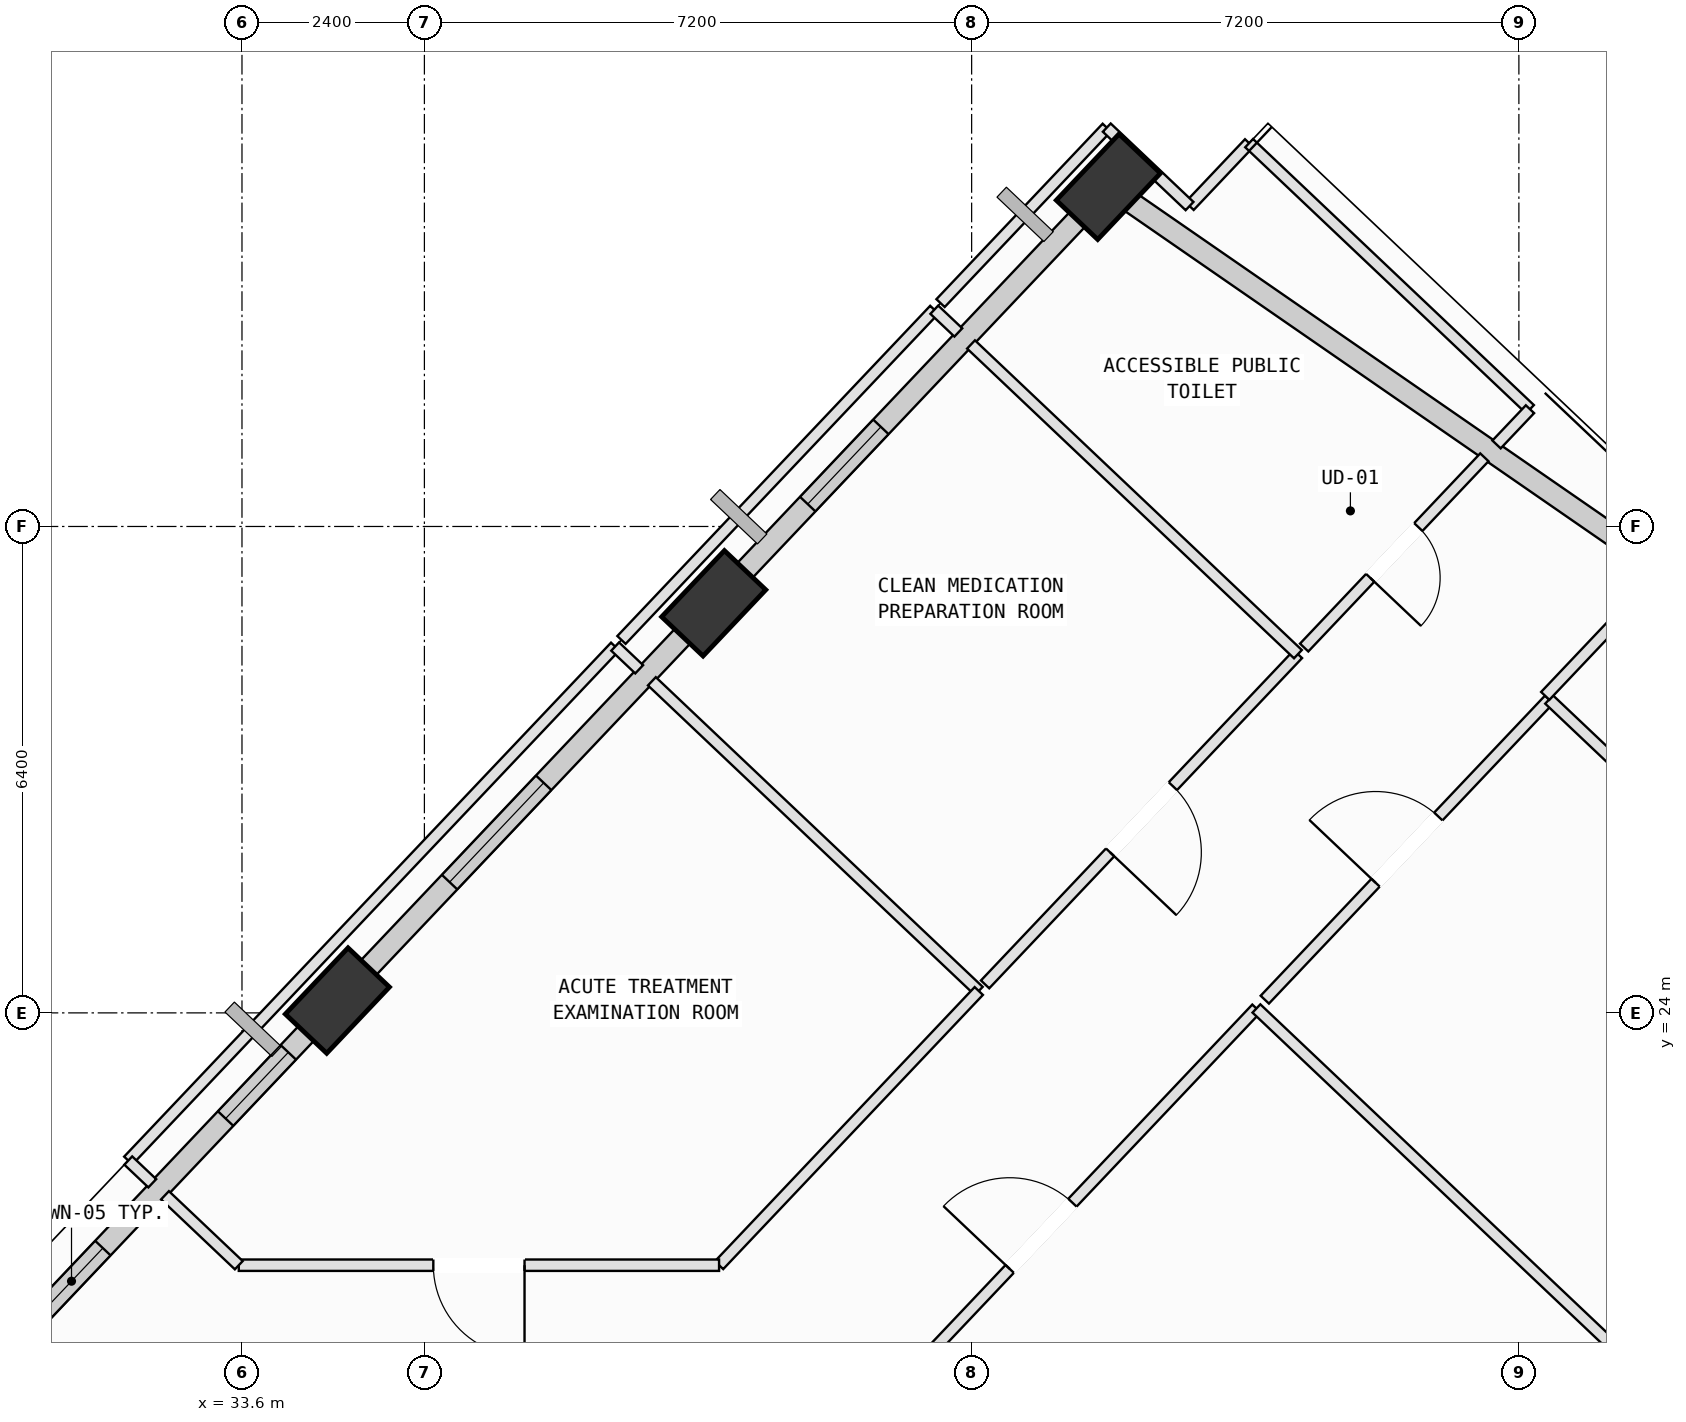
"""IFC4 building model, lengths in metres.
Left out: names, types, materials, properties, quantities, classifications, styles, units other than length and angle.
Written with IfcOpenShell. Run it as: python <this file> out.ifc"""

import sys

from ifc_helpers import new_model, si_unit, direction, frame, frame_2d, origin, origin_2d, place, context, subcontext, project, spatial, rectangle, extrude, element, fill, save


model = new_model("IFC4")
c1 = context("Model", 3, precision=1e-05, world=origin(), true_north=direction((0.0, 1.0)))
c2 = subcontext(c1, "Body", "Model", "MODEL_VIEW")
j1 = project(units=[si_unit("LENGTHUNIT", "METRE"), si_unit("PLANEANGLEUNIT", "RADIAN")], contexts=[c1])
p1 = place(None, origin())
s1 = spatial("IfcSite", under=j1, at=p1, CompositionType="ELEMENT")
p2 = place(p1, origin())
s2 = spatial("IfcBuilding", under=s1, at=p2, CompositionType="ELEMENT")
p3 = place(p2, frame((0.0, 0.0, 223.2)))
s3 = spatial("IfcBuildingStorey", under=s2, at=p3, CompositionType="ELEMENT", Elevation=223.2)
p4 = place(p3, frame((44.999, 34.87, 0.002), z_axis=(-0.042069253903, 0.046824908692, 0.998016836432), x_axis=(-0.027353525859, -0.998580716185, 0.045698335707)))
e1 = element("IfcColumn", 1, at=p4, inside=s3, PredefinedType="COLUMN", context=c2, shape_type="SweptSolid", body=[
    extrude(rectangle(XDim=1.2, YDim=0.75, at=origin_2d()), origin(), (0.0, 0.0, 1.0), 4.004),
])
p5 = place(p3, frame((39.807, 29.389, 0.002), z_axis=(-0.019233832393, 0.025584050071, 0.999487626774), x_axis=(-0.113678552433, -0.993245812131, 0.02323668222)))
e2 = element("IfcColumn", 2, at=p5, inside=s3, PredefinedType="COLUMN", context=c2, shape_type="SweptSolid", body=[
    extrude(rectangle(XDim=1.2, YDim=0.75, at=origin_2d()), origin(), (0.0, 0.0, 1.0), 3.998),
])
p6 = place(p3, frame((34.855, 24.162, 0.002), z_axis=(0.002565781789, 0.005253743664, 0.999982907325), x_axis=(-0.936541946319, -0.35052983598, 0.004244628727)))
e3 = element("IfcColumn", 3, at=p6, inside=s3, PredefinedType="COLUMN", context=c2, shape_type="SweptSolid", body=[
    extrude(rectangle(XDim=1.2, YDim=0.75, at=origin_2d()), origin(), (0.0, 0.0, 1.0), 3.996),
])
p7 = place(p3, frame((45.224, 34.714, 0.0), z_axis=(0.0, 0.0, 1.0), x_axis=(0.82254121979, -0.568705496497, 0.0)))
e4 = element("IfcWall", 4, at=p7, inside=s3, PredefinedType="SOLIDWALL", context=c2, shape_type="SweptSolid", body=[
    extrude(rectangle(XDim=9.036, YDim=0.28, at=frame_2d((4.518, 0.0))), origin(), (0.0, 0.0, 1.0), 3.265),
])
p8 = place(p3, frame((40.084, 29.682, 0.0), z_axis=(0.0, 0.0, 1.0), x_axis=(0.687708690175, 0.72598674744, 0.0)))
e5 = element("IfcWall", 5, at=p8, inside=s3, PredefinedType="SOLIDWALL", context=c2, shape_type="SweptSolid", body=[
    extrude(rectangle(XDim=6.78, YDim=0.28, at=frame_2d((3.39, 0.0))), origin(), (0.0, 0.0, 1.0), 3.165),
])
p9 = place(p8, frame((1.395, 0.0, 0.75)))
e6 = element("IfcOpeningElement", 6, at=p9, cuts=e5, PredefinedType="OPENING", context=c2, shape_type="SweptSolid", body=[
    extrude(rectangle(XDim=1.4, YDim=1.85, at=frame_2d((0.7, 0.925))), frame((0.0, 0.15, 0.0), z_axis=(0.0, -1.0, 0.0), x_axis=(1.0, 0.0, 0.0)), (0.0, 0.0, 1.0), 0.3),
])
p10 = place(p3, frame((35.136, 24.459, 0.0), z_axis=(0.0, 0.0, 1.0), x_axis=(0.687726686708, 0.725969699361, 0.0)))
e7 = element("IfcWall", 7, at=p10, inside=s3, PredefinedType="SOLIDWALL", context=c2, shape_type="SweptSolid", body=[
    extrude(rectangle(XDim=6.409, YDim=0.28, at=frame_2d((3.205, 0.0))), origin(), (0.0, 0.0, 1.0), 3.265),
])
p11 = place(p10, frame((1.738, 0.0, 0.75)))
e8 = element("IfcOpeningElement", 8, at=p11, cuts=e7, PredefinedType="OPENING", context=c2, shape_type="SweptSolid", body=[
    extrude(rectangle(XDim=1.8, YDim=2.05, at=frame_2d((0.9, 1.025))), frame((0.0, 0.15, 0.0), z_axis=(0.0, -1.0, 0.0), x_axis=(1.0, 0.0, 0.0)), (0.0, 0.0, 1.0), 0.3),
])
p12 = place(p3, frame((30.354, 19.411, 0.0), z_axis=(0.0, 0.0, 1.0), x_axis=(0.68771935581, 0.725976644007, 0.0)))
e9 = element("IfcWall", 9, at=p12, inside=s3, PredefinedType="SOLIDWALL", context=c2, shape_type="SweptSolid", body=[
    extrude(rectangle(XDim=6.158, YDim=0.28, at=frame_2d((3.079, 0.0))), origin(), (0.0, 0.0, 1.0), 3.265),
])
p13 = place(p12, frame((0.858, 0.0, 0.75)))
e10 = element("IfcOpeningElement", 10, at=p13, cuts=e9, PredefinedType="OPENING", context=c2, shape_type="SweptSolid", body=[
    extrude(rectangle(XDim=1.2, YDim=1.75, at=frame_2d((0.6, 0.875))), frame((0.0, 0.15, 0.0), z_axis=(0.0, -1.0, 0.0), x_axis=(1.0, 0.0, 0.0)), (0.0, 0.0, 1.0), 0.3),
])
p14 = place(p12, frame((4.406, 0.0, 0.75)))
e11 = element("IfcOpeningElement", 11, at=p14, cuts=e9, PredefinedType="OPENING", context=c2, shape_type="SweptSolid", body=[
    extrude(rectangle(XDim=1.2, YDim=1.75, at=frame_2d((0.6, 0.875))), frame((0.0, 0.15, 0.0), z_axis=(0.0, -1.0, 0.0), x_axis=(1.0, 0.0, 0.0)), (0.0, 0.0, 1.0), 0.3),
])
p15 = place(p3, frame((41.28, 18.076, 0.0), z_axis=(0.0, 0.0, 1.0), x_axis=(0.687723280908, 0.725972925732, 0.0)))
e12 = element("IfcWall", 12, at=p15, inside=s3, PredefinedType="PARTITIONING", context=c2, shape_type="SweptSolid", body=[
    extrude(rectangle(XDim=8.24, YDim=0.15, at=frame_2d((4.12, 0.0))), origin(), (0.0, 0.0, 1.0), 3.78),
])
p16 = place(p15, frame((3.52, 0.0, 0.0)))
e13 = element("IfcOpeningElement", 13, at=p16, cuts=e12, PredefinedType="OPENING", context=c2, shape_type="SweptSolid", body=[
    extrude(rectangle(XDim=1.2, YDim=2.15, at=frame_2d((0.6, 1.075))), frame((0.0, 0.085, 0.0), z_axis=(0.0, -1.0, 0.0), x_axis=(1.0, 0.0, 0.0)), (0.0, 0.0, 1.0), 0.17),
])
p17 = place(p3, frame((46.947, 24.058, 0.0), z_axis=(0.0, 0.0, 1.0), x_axis=(0.725954834058, -0.687742378298, 0.0)))
e14 = element("IfcWall", 14, at=p17, inside=s3, PredefinedType="PARTITIONING", context=c2, shape_type="SweptSolid", body=[
    extrude(rectangle(XDim=11.935, YDim=0.15, at=frame_2d((5.967, 0.0))), origin(), (0.0, 0.0, 1.0), 3.78),
])
p18 = place(p3, frame((47.057, 24.174, 0.0), z_axis=(0.0, 0.0, 1.0), x_axis=(0.687752117074, 0.725945607783, 0.0)))
e15 = element("IfcWall", 15, at=p18, inside=s3, PredefinedType="PARTITIONING", context=c2, shape_type="SweptSolid", body=[
    extrude(rectangle(XDim=5.44, YDim=0.15, at=frame_2d((2.72, 0.0))), origin(), (0.0, 0.0, 1.0), 3.78),
])
p19 = place(p18, frame((2.12, 0.0, 0.0)))
e16 = element("IfcOpeningElement", 16, at=p19, cuts=e15, PredefinedType="OPENING", context=c2, shape_type="SweptSolid", body=[
    extrude(rectangle(XDim=1.2, YDim=2.15, at=frame_2d((0.6, 1.075))), frame((0.0, 0.085, 0.0), z_axis=(0.0, -1.0, 0.0), x_axis=(1.0, 0.0, 0.0)), (0.0, 0.0, 1.0), 0.17),
])
p20 = place(p3, frame((50.798, 28.123, 0.0), z_axis=(0.0, 0.0, 1.0), x_axis=(0.72594065617, -0.687757343632, 0.0)))
e17 = element("IfcWall", 17, at=p20, inside=s3, PredefinedType="PARTITIONING", context=c2, shape_type="SweptSolid", body=[
    extrude(rectangle(XDim=10.134, YDim=0.15, at=frame_2d((5.067, 0.0))), origin(), (0.0, 0.0, 1.0), 3.78),
])
p21 = place(p20, frame((4.637, 0.0, 0.0)))
e18 = element("IfcOpeningElement", 18, at=p21, cuts=e17, PredefinedType="OPENING", context=c2, shape_type="SweptSolid", body=[
    extrude(rectangle(XDim=0.86, YDim=2.06, at=frame_2d((0.43, 1.03))), frame((0.0, 0.085, 0.0), z_axis=(0.0, -1.0, 0.0), x_axis=(1.0, 0.0, 0.0)), (0.0, 0.0, 1.0), 0.17),
])
p22 = place(p3, frame((32.104, 22.057, 0.0), z_axis=(0.0, 0.0, 1.0), x_axis=(0.687675585373, 0.72601810534, 0.0)))
e19 = element("IfcWall", 19, at=p22, inside=s3, PredefinedType="PARTITIONING", context=c2, shape_type="SweptSolid", body=[
    extrude(rectangle(XDim=9.315, YDim=0.15, at=frame_2d((4.658, 0.0))), origin(), (0.0, 0.0, 1.0), 3.78),
])
p23 = place(p3, frame((38.51, 28.82, 0.0), z_axis=(0.0, 0.0, 1.0), x_axis=(0.726203335954, -0.687479974145, 0.0)))
e20 = element("IfcWall", 20, at=p23, inside=s3, PredefinedType="PARTITIONING", context=c2, shape_type="SweptSolid", body=[
    extrude(rectangle(XDim=0.435, YDim=0.15, at=frame_2d((0.218, 0.0))), origin(), (0.0, 0.0, 1.0), 3.78),
])
p24 = place(p3, frame((38.993, 28.363, 0.0), z_axis=(0.0, 0.0, 1.0), x_axis=(0.725927779308, -0.687770935144, 0.0)))
e21 = element("IfcWall", 21, at=p24, inside=s3, PredefinedType="PARTITIONING", context=c2, shape_type="SweptSolid", body=[
    extrude(rectangle(XDim=5.925, YDim=0.15, at=frame_2d((2.962, 0.0))), origin(), (0.0, 0.0, 1.0), 3.78),
])
p25 = place(p3, frame((43.294, 24.288, 0.0), z_axis=(0.0, 0.0, 1.0), x_axis=(-0.687611091147, -0.726079188058, 0.0)))
e22 = element("IfcWall", 22, at=p25, inside=s3, PredefinedType="PARTITIONING", context=c2, shape_type="SweptSolid", body=[
    extrude(rectangle(XDim=4.969, YDim=0.15, at=frame_2d((2.485, 0.0))), origin(), (0.0, 0.0, 1.0), 3.78),
])
p26 = place(p3, frame((39.877, 20.68, 0.0), z_axis=(0.0, 0.0, 1.0), x_axis=(-1.0, 0.0, 0.0)))
e23 = element("IfcWall", 23, at=p26, inside=s3, PredefinedType="PARTITIONING", context=c2, shape_type="SweptSolid", body=[
    extrude(rectangle(XDim=6.319, YDim=0.15, at=frame_2d((3.159, 0.0))), origin(), (0.0, 0.0, 1.0), 3.78),
])
p27 = place(p26, frame((2.56, 0.0, 0.0)))
e24 = element("IfcOpeningElement", 24, at=p27, cuts=e23, PredefinedType="OPENING", context=c2, shape_type="SweptSolid", body=[
    extrude(rectangle(XDim=1.2, YDim=2.15, at=frame_2d((0.6, 1.075))), frame((0.0, 0.085, 0.0), z_axis=(0.0, -1.0, 0.0), x_axis=(1.0, 0.0, 0.0)), (0.0, 0.0, 1.0), 0.17),
])
p28 = place(p3, frame((33.558, 20.68, 0.0), z_axis=(0.0, 0.0, 1.0), x_axis=(-0.725919116745, 0.687780078183, 0.0)))
e25 = element("IfcWall", 25, at=p28, inside=s3, PredefinedType="PARTITIONING", context=c2, shape_type="SweptSolid", body=[
    extrude(rectangle(XDim=1.338, YDim=0.15, at=frame_2d((0.669, 0.0))), origin(), (0.0, 0.0, 1.0), 3.78),
])
p29 = place(p3, frame((32.42, 21.758, 0.0), z_axis=(0.0, 0.0, 1.0), x_axis=(-0.726483567021, 0.687183837738, 0.0)))
e26 = element("IfcWall", 26, at=p29, inside=s3, PredefinedType="PARTITIONING", context=c2, shape_type="SweptSolid", body=[
    extrude(rectangle(XDim=0.435, YDim=0.15, at=frame_2d((0.217, 0.0))), origin(), (0.0, 0.0, 1.0), 3.78),
])
p30 = place(p3, frame((47.493, 28.72, 0.0), z_axis=(0.0, 0.0, 1.0), x_axis=(-0.687716360799, -0.725979481176, 0.0)))
e27 = element("IfcWall", 27, at=p30, inside=s3, PredefinedType="PARTITIONING", context=c2, shape_type="SweptSolid", body=[
    extrude(rectangle(XDim=5.985, YDim=0.15, at=frame_2d((2.992, 0.0))), origin(), (0.0, 0.0, 1.0), 3.78),
])
p31 = place(p30, frame((2.393, 0.0, 0.0)))
e28 = element("IfcOpeningElement", 28, at=p31, cuts=e27, PredefinedType="OPENING", context=c2, shape_type="SweptSolid", body=[
    extrude(rectangle(XDim=1.2, YDim=2.15, at=frame_2d((0.6, 1.075))), frame((0.0, 0.085, 0.0), z_axis=(0.0, -1.0, 0.0), x_axis=(1.0, 0.0, 0.0)), (0.0, 0.0, 1.0), 0.17),
])
p32 = place(p3, frame((38.593, 28.907, 0.0), z_axis=(0.0, 0.0, 1.0), x_axis=(0.687716360799, 0.725979481176, 0.0)))
e29 = element("IfcWall", 29, at=p32, inside=s3, PredefinedType="PARTITIONING", context=c2, shape_type="SweptSolid", body=[
    extrude(rectangle(XDim=5.985, YDim=0.15, at=frame_2d((2.992, 0.0))), origin(), (0.0, 0.0, 1.0), 3.265),
])
p33 = place(p3, frame((42.709, 33.252, 0.0), z_axis=(0.0, 0.0, 1.0), x_axis=(0.726203335954, -0.687479974145, 0.0)))
e30 = element("IfcWall", 30, at=p33, inside=s3, PredefinedType="PARTITIONING", context=c2, shape_type="SweptSolid", body=[
    extrude(rectangle(XDim=0.435, YDim=0.15, at=frame_2d((0.218, 0.0))), origin(), (0.0, 0.0, 1.0), 3.78),
])
p34 = place(p3, frame((43.192, 32.795, 0.0), z_axis=(0.0, 0.0, 1.0), x_axis=(0.725927779308, -0.687770935144, 0.0)))
e31 = element("IfcWall", 31, at=p34, inside=s3, PredefinedType="PARTITIONING", context=c2, shape_type="SweptSolid", body=[
    extrude(rectangle(XDim=5.925, YDim=0.15, at=frame_2d((2.962, 0.0))), origin(), (0.0, 0.0, 1.0), 3.78),
])
p35 = place(p3, frame((46.067, 34.616, 0.0), z_axis=(0.0, 0.0, 1.0), x_axis=(0.687578377548, 0.726110167074, 0.0)))
e32 = element("IfcWall", 32, at=p35, inside=s3, PredefinedType="PARTITIONING", context=c2, shape_type="SweptSolid", body=[
    extrude(rectangle(XDim=1.14, YDim=0.15, at=frame_2d((0.57, 0.0))), origin(), (0.0, 0.0, 1.0), 3.78),
])
p36 = place(p3, frame((46.851, 35.444, 0.0), z_axis=(0.0, 0.0, 1.0), x_axis=(0.725892183021, -0.68780850433, 0.0)))
e33 = element("IfcWall", 33, at=p36, inside=s3, PredefinedType="PARTITIONING", context=c2, shape_type="SweptSolid", body=[
    extrude(rectangle(XDim=5.09, YDim=0.15, at=frame_2d((2.545, 0.0))), origin(), (0.0, 0.0, 1.0), 3.78),
])
p37 = place(p3, frame((50.546, 31.943, 0.0), z_axis=(0.0, 0.0, 1.0), x_axis=(-0.687956405575, -0.725752012762, 0.0)))
e34 = element("IfcWall", 34, at=p37, inside=s3, PredefinedType="PARTITIONING", context=c2, shape_type="SweptSolid", body=[
    extrude(rectangle(XDim=0.639, YDim=0.15, at=frame_2d((0.32, 0.0))), origin(), (0.0, 0.0, 1.0), 3.78),
])
p38 = place(p3, frame((49.946, 31.31, 0.0), z_axis=(0.0, 0.0, 1.0), x_axis=(-0.687693581287, -0.726001059405, 0.0)))
e35 = element("IfcWall", 35, at=p38, inside=s3, PredefinedType="PARTITIONING", context=c2, shape_type="SweptSolid", body=[
    extrude(rectangle(XDim=3.448, YDim=0.15, at=frame_2d((1.724, 0.0))), origin(), (0.0, 0.0, 1.0), 3.78),
])
p39 = place(p38, frame((1.264, 0.0, 0.0)))
e36 = element("IfcOpeningElement", 36, at=p39, cuts=e35, PredefinedType="OPENING", context=c2, shape_type="SweptSolid", body=[
    extrude(rectangle(XDim=0.92, YDim=2.1, at=frame_2d((0.46, 1.05))), frame((0.0, 0.085, 0.0), z_axis=(0.0, -1.0, 0.0), x_axis=(1.0, 0.0, 0.0)), (0.0, 0.0, 1.0), 0.17),
])
p40 = place(p3, frame((42.791, 33.339, 0.0), z_axis=(0.0, 0.0, 1.0), x_axis=(0.687693541823, 0.726001096787, 0.0)))
e37 = element("IfcWall", 37, at=p40, inside=s3, PredefinedType="PARTITIONING", context=c2, shape_type="SweptSolid", body=[
    extrude(rectangle(XDim=3.18, YDim=0.15, at=frame_2d((1.59, 0.0))), origin(), (0.0, 0.0, 1.0), 3.165),
])
p41 = place(p3, frame((44.978, 35.648, 0.0), z_axis=(0.0, 0.0, 1.0), x_axis=(0.725811549819, -0.687893592171, 0.0)))
e38 = element("IfcWall", 38, at=p41, inside=s3, PredefinedType="PARTITIONING", context=c2, shape_type="SweptSolid", body=[
    extrude(rectangle(XDim=1.5, YDim=0.15, at=frame_2d((0.75, 0.0))), origin(), (0.0, 0.0, 1.0), 3.265),
])
p42 = place(p3, frame((50.747, 28.171, 0.0), z_axis=(0.0, 0.0, 1.0), x_axis=(0.687788705191, 0.725910942893, 0.0)))
e39 = element("IfcWall", 39, at=p42, inside=s3, PredefinedType="PARTITIONING", context=c2, shape_type="SweptSolid", body=[
    extrude(rectangle(XDim=2.152, YDim=0.15, at=frame_2d((1.076, 0.0))), origin(), (0.0, 0.0, 1.0), 3.78),
])
p43 = place(p9, origin())
e40 = element("IfcWindow", 40, at=p43, inside=s3, PartitioningType="SINGLE_PANEL", PredefinedType="WINDOW", context=c2, shape_type="SweptSolid", body=[
    extrude(rectangle(XDim=1.4, YDim=1.85, at=frame_2d((0.7, 0.925))), frame((0.0, 0.03, 0.0), z_axis=(0.0, -1.0, 0.0), x_axis=(1.0, 0.0, 0.0)), (0.0, 0.0, 1.0), 0.06),
])
fill(e6, e40)
p44 = place(p11, origin())
e41 = element("IfcWindow", 41, at=p44, inside=s3, PartitioningType="SINGLE_PANEL", PredefinedType="WINDOW", context=c2, shape_type="SweptSolid", body=[
    extrude(rectangle(XDim=1.8, YDim=2.05, at=frame_2d((0.9, 1.025))), frame((0.0, 0.03, 0.0), z_axis=(0.0, -1.0, 0.0), x_axis=(1.0, 0.0, 0.0)), (0.0, 0.0, 1.0), 0.06),
])
fill(e8, e41)
p45 = place(p13, origin())
e42 = element("IfcWindow", 42, at=p45, inside=s3, PartitioningType="SINGLE_PANEL", PredefinedType="WINDOW", context=c2, shape_type="SweptSolid", body=[
    extrude(rectangle(XDim=1.2, YDim=1.75, at=frame_2d((0.6, 0.875))), frame((0.0, 0.03, 0.0), z_axis=(0.0, -1.0, 0.0), x_axis=(1.0, 0.0, 0.0)), (0.0, 0.0, 1.0), 0.06),
])
fill(e10, e42)
p46 = place(p14, origin())
e43 = element("IfcWindow", 43, at=p46, inside=s3, PartitioningType="SINGLE_PANEL", PredefinedType="WINDOW", context=c2, shape_type="SweptSolid", body=[
    extrude(rectangle(XDim=1.2, YDim=1.75, at=frame_2d((0.6, 0.875))), frame((0.0, 0.03, 0.0), z_axis=(0.0, -1.0, 0.0), x_axis=(1.0, 0.0, 0.0)), (0.0, 0.0, 1.0), 0.06),
])
fill(e11, e43)
p47 = place(p16, origin())
e44 = element("IfcDoor", 44, at=p47, inside=s3, OperationType="SINGLE_SWING_LEFT", PredefinedType="DOOR", context=c2, shape_type="SweptSolid", body=[
    extrude(rectangle(XDim=1.2, YDim=2.15, at=frame_2d((0.6, 1.075))), frame((0.0, 0.025, 0.0), z_axis=(0.0, -1.0, 0.0), x_axis=(1.0, 0.0, 0.0)), (0.0, 0.0, 1.0), 0.05),
])
fill(e13, e44)
p48 = place(p19, origin())
e45 = element("IfcDoor", 45, at=p48, inside=s3, OperationType="SINGLE_SWING_LEFT", PredefinedType="DOOR", context=c2, shape_type="SweptSolid", body=[
    extrude(rectangle(XDim=1.2, YDim=2.15, at=frame_2d((0.6, 1.075))), frame((0.0, 0.025, 0.0), z_axis=(0.0, -1.0, 0.0), x_axis=(1.0, 0.0, 0.0)), (0.0, 0.0, 1.0), 0.05),
])
fill(e16, e45)
p49 = place(p27, origin())
e46 = element("IfcDoor", 46, at=p49, inside=s3, OperationType="SINGLE_SWING_LEFT", PredefinedType="DOOR", context=c2, shape_type="SweptSolid", body=[
    extrude(rectangle(XDim=1.2, YDim=2.15, at=frame_2d((0.6, 1.075))), frame((0.0, 0.025, 0.0), z_axis=(0.0, -1.0, 0.0), x_axis=(1.0, 0.0, 0.0)), (0.0, 0.0, 1.0), 0.05),
])
fill(e24, e46)
p50 = place(p31, origin())
e47 = element("IfcDoor", 47, at=p50, inside=s3, OperationType="SINGLE_SWING_RIGHT", PredefinedType="DOOR", context=c2, shape_type="SweptSolid", body=[
    extrude(rectangle(XDim=1.2, YDim=2.15, at=frame_2d((0.6, 1.075))), frame((0.0, 0.025, 0.0), z_axis=(0.0, -1.0, 0.0), x_axis=(1.0, 0.0, 0.0)), (0.0, 0.0, 1.0), 0.05),
])
fill(e28, e47)
p51 = place(p39, origin())
e48 = element("IfcDoor", 48, at=p51, inside=s3, OperationType="SINGLE_SWING_RIGHT", PredefinedType="DOOR", context=c2, shape_type="SweptSolid", body=[
    extrude(rectangle(XDim=0.92, YDim=2.1, at=frame_2d((0.46, 1.05))), frame((0.0, 0.025, 0.0), z_axis=(0.0, -1.0, 0.0), x_axis=(1.0, 0.0, 0.0)), (0.0, 0.0, 1.0), 0.05),
])
fill(e36, e48)
save(model, sys.argv[1])
